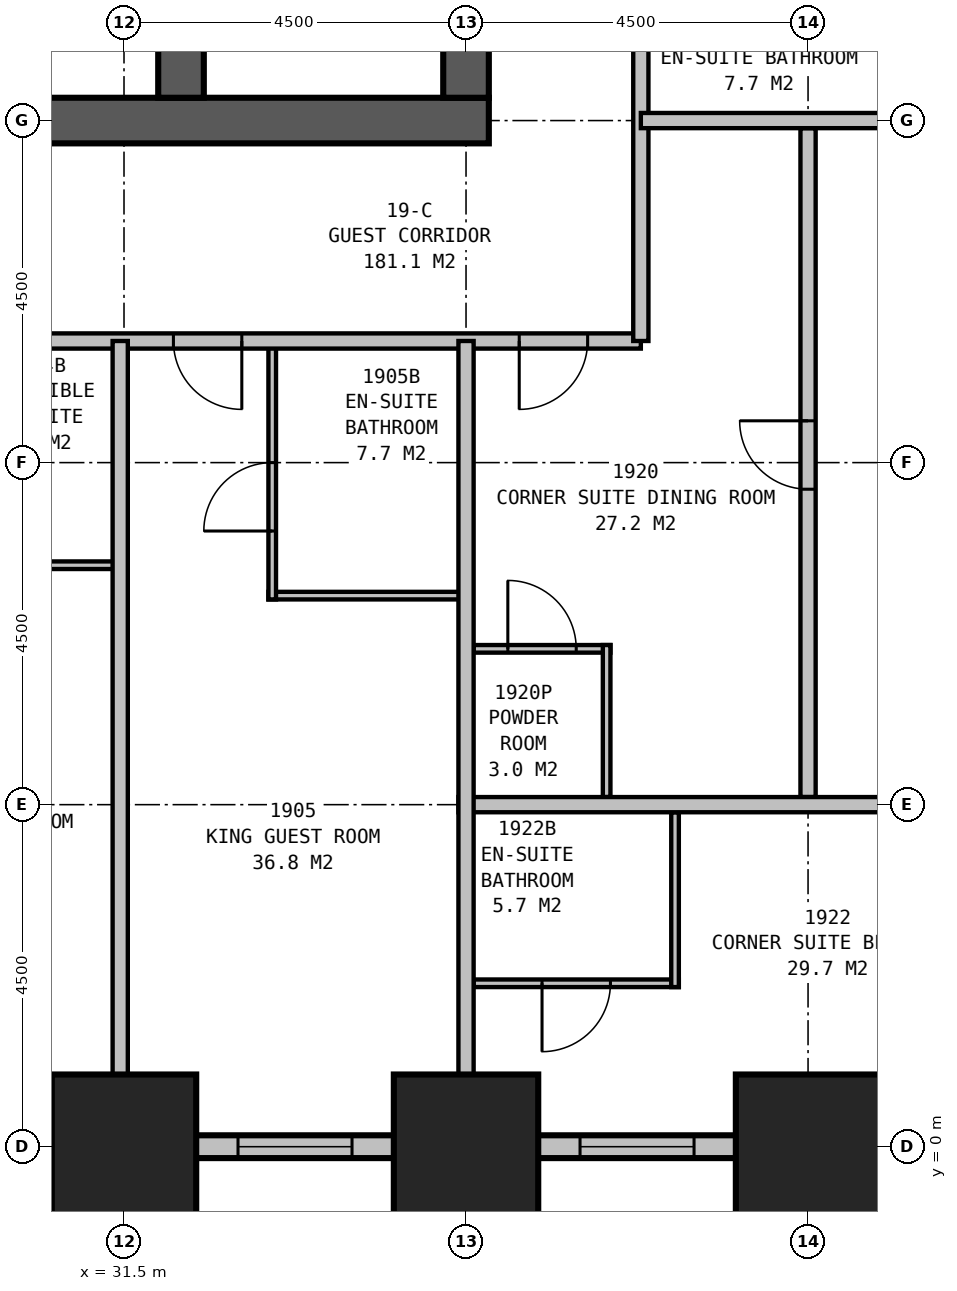
"""IFC4 building model, lengths in metres.
Left out: names, types, materials, properties, quantities, classifications, styles, units other than length and angle.
Written with IfcOpenShell. Run it as: python <this file> out.ifc"""

import sys

from ifc_helpers import new_model, si_unit, direction, frame, frame_2d, origin, origin_2d, place, context, subcontext, project, spatial, rectangle, extrude, element, fill, save


model = new_model("IFC4")
c1 = context("Model", 3, precision=1e-05, world=origin(), true_north=direction((0.0, 1.0)))
c2 = subcontext(c1, "Body", "Model", "MODEL_VIEW")
j1 = project(units=[si_unit("LENGTHUNIT", "METRE"), si_unit("PLANEANGLEUNIT", "RADIAN")], contexts=[c1])
p1 = place(None, origin())
s1 = spatial("IfcSite", under=j1, at=p1, CompositionType="ELEMENT")
p2 = place(p1, origin())
s2 = spatial("IfcBuilding", under=s1, at=p2, CompositionType="ELEMENT")
p3 = place(p2, frame((0.0, 0.0, 78.7)))
s3 = spatial("IfcBuildingStorey", under=s2, at=p3, CompositionType="ELEMENT", Elevation=78.7)
for number, where, z_axis, x_axis in (
    (1, (31.5, 0.0, 0.0), (0.0, 0.0, 1.0), (1.0, 0.0, 0.0)),
    (2, (36.0, 0.0, 0.0), (0.0, 0.0, 1.0), (1.0, 0.0, 0.0)),
    (3, (40.5, 0.0, 0.0), (0.0, 0.0, 1.0), (1.0, 0.0, 0.0)),
):
    element("IfcColumn", number, at=place(p3, frame(where, z_axis=z_axis, x_axis=x_axis)), inside=s3, PredefinedType="COLUMN", context=c2, shape_type="SweptSolid", body=[
        extrude(rectangle(XDim=1.9, YDim=1.9, at=origin_2d()), origin(), (0.0, 0.0, 1.0), 3.5),
    ])
p4 = place(p3, frame((13.2, 13.5, 0.0), z_axis=(0.0, 0.0, 1.0), x_axis=(1.0, 0.0, 0.0)))
e4 = element("IfcWall", 4, at=p4, inside=s3, PredefinedType="SHEAR", context=c2, shape_type="SweptSolid", body=[
    extrude(rectangle(XDim=23.1, YDim=0.6, at=frame_2d((11.55, 0.0))), origin(), (0.0, 0.0, 1.0), 3.5),
])
p5 = place(p3, frame((32.25, 13.8, 0.0), z_axis=(0.0, 0.0, 1.0), x_axis=(0.0, 1.0, 0.0)))
e5 = element("IfcWall", 5, at=p5, inside=s3, PredefinedType="SHEAR", context=c2, shape_type="SweptSolid", body=[
    extrude(rectangle(XDim=12.9, YDim=0.6, at=frame_2d((6.45, 0.0))), origin(), (0.0, 0.0, 1.0), 3.5),
])
p6 = place(p5, frame((5.05, 0.0, 0.0), z_axis=(0.0, 0.0, 1.0), x_axis=(-1.0, 0.0, 0.0)))
e6 = element("IfcOpeningElement", 6, at=p6, cuts=e5, PredefinedType="OPENING", context=c2, shape_type="SweptSolid", body=[
    extrude(rectangle(XDim=1.2, YDim=2.1, at=frame_2d((0.6, 1.05))), frame((0.0, 0.31, 0.0), z_axis=(0.0, -1.0, 0.0), x_axis=(1.0, 0.0, 0.0)), (0.0, 0.0, 1.0), 0.62),
])
p7 = place(p3, frame((36.0, 13.8, 0.0), z_axis=(0.0, 0.0, 1.0), x_axis=(0.0, 1.0, 0.0)))
e7 = element("IfcWall", 7, at=p7, inside=s3, PredefinedType="SHEAR", context=c2, shape_type="SweptSolid", body=[
    extrude(rectangle(XDim=2.7, YDim=0.6, at=frame_2d((1.35, 0.0))), origin(), (0.0, 0.0, 1.0), 3.5),
])
p8 = place(p3, frame((4.35, 0.0, 0.0), z_axis=(0.0, 0.0, 1.0), x_axis=(1.0, 0.0, 0.0)))
e8 = element("IfcWall", 8, at=p8, inside=s3, PredefinedType="STANDARD", context=c2, shape_type="SweptSolid", body=[
    extrude(rectangle(XDim=40.8, YDim=0.3, at=frame_2d((20.4, 0.0))), origin(), (0.0, 0.0, 1.0), 2.05),
])
p9 = place(p8, frame((1.65, 0.0, 0.5)))
e9 = element("IfcOpeningElement", 9, at=p9, cuts=e8, PredefinedType="OPENING", context=c2, shape_type="SweptSolid", body=[
    extrude(rectangle(XDim=1.5, YDim=1.4, at=frame_2d((0.75, 0.7))), frame((0.0, 0.16, 0.0), z_axis=(0.0, -1.0, 0.0), x_axis=(1.0, 0.0, 0.0)), (0.0, 0.0, 1.0), 0.32),
])
p10 = place(p8, frame((6.15, 0.0, 0.5)))
e10 = element("IfcOpeningElement", 10, at=p10, cuts=e8, PredefinedType="OPENING", context=c2, shape_type="SweptSolid", body=[
    extrude(rectangle(XDim=1.5, YDim=1.4, at=frame_2d((0.75, 0.7))), frame((0.0, 0.16, 0.0), z_axis=(0.0, -1.0, 0.0), x_axis=(1.0, 0.0, 0.0)), (0.0, 0.0, 1.0), 0.32),
])
p11 = place(p8, frame((10.65, 0.0, 0.5)))
e11 = element("IfcOpeningElement", 11, at=p11, cuts=e8, PredefinedType="OPENING", context=c2, shape_type="SweptSolid", body=[
    extrude(rectangle(XDim=1.5, YDim=1.4, at=frame_2d((0.75, 0.7))), frame((0.0, 0.16, 0.0), z_axis=(0.0, -1.0, 0.0), x_axis=(1.0, 0.0, 0.0)), (0.0, 0.0, 1.0), 0.32),
])
p12 = place(p8, frame((15.15, 0.0, 0.5)))
e12 = element("IfcOpeningElement", 12, at=p12, cuts=e8, PredefinedType="OPENING", context=c2, shape_type="SweptSolid", body=[
    extrude(rectangle(XDim=1.5, YDim=1.4, at=frame_2d((0.75, 0.7))), frame((0.0, 0.16, 0.0), z_axis=(0.0, -1.0, 0.0), x_axis=(1.0, 0.0, 0.0)), (0.0, 0.0, 1.0), 0.32),
])
p13 = place(p8, frame((19.65, 0.0, 0.5)))
e13 = element("IfcOpeningElement", 13, at=p13, cuts=e8, PredefinedType="OPENING", context=c2, shape_type="SweptSolid", body=[
    extrude(rectangle(XDim=1.5, YDim=1.4, at=frame_2d((0.75, 0.7))), frame((0.0, 0.16, 0.0), z_axis=(0.0, -1.0, 0.0), x_axis=(1.0, 0.0, 0.0)), (0.0, 0.0, 1.0), 0.32),
])
p14 = place(p8, frame((24.15, 0.0, 0.5)))
e14 = element("IfcOpeningElement", 14, at=p14, cuts=e8, PredefinedType="OPENING", context=c2, shape_type="SweptSolid", body=[
    extrude(rectangle(XDim=1.5, YDim=1.4, at=frame_2d((0.75, 0.7))), frame((0.0, 0.16, 0.0), z_axis=(0.0, -1.0, 0.0), x_axis=(1.0, 0.0, 0.0)), (0.0, 0.0, 1.0), 0.32),
])
p15 = place(p8, frame((28.65, 0.0, 0.5)))
e15 = element("IfcOpeningElement", 15, at=p15, cuts=e8, PredefinedType="OPENING", context=c2, shape_type="SweptSolid", body=[
    extrude(rectangle(XDim=1.5, YDim=1.4, at=frame_2d((0.75, 0.7))), frame((0.0, 0.16, 0.0), z_axis=(0.0, -1.0, 0.0), x_axis=(1.0, 0.0, 0.0)), (0.0, 0.0, 1.0), 0.32),
])
p16 = place(p8, frame((33.15, 0.0, 0.5)))
e16 = element("IfcOpeningElement", 16, at=p16, cuts=e8, PredefinedType="OPENING", context=c2, shape_type="SweptSolid", body=[
    extrude(rectangle(XDim=1.5, YDim=1.4, at=frame_2d((0.75, 0.7))), frame((0.0, 0.16, 0.0), z_axis=(0.0, -1.0, 0.0), x_axis=(1.0, 0.0, 0.0)), (0.0, 0.0, 1.0), 0.32),
])
p17 = place(p8, frame((37.65, 0.0, 0.5)))
e17 = element("IfcOpeningElement", 17, at=p17, cuts=e8, PredefinedType="OPENING", context=c2, shape_type="SweptSolid", body=[
    extrude(rectangle(XDim=1.5, YDim=1.4, at=frame_2d((0.75, 0.7))), frame((0.0, 0.16, 0.0), z_axis=(0.0, -1.0, 0.0), x_axis=(1.0, 0.0, 0.0)), (0.0, 0.0, 1.0), 0.32),
])
p18 = place(p3, frame((11.2, 10.6, 0.0), z_axis=(0.0, 0.0, 1.0), x_axis=(1.0, 0.0, 0.0)))
e18 = element("IfcWall", 18, at=p18, inside=s3, PredefinedType="PARTITIONING", context=c2, shape_type="SweptSolid", body=[
    extrude(rectangle(XDim=27.1, YDim=0.2, at=frame_2d((13.55, 0.0))), origin(), (0.0, 0.0, 1.0), 3.25),
])
p19 = place(p18, frame((3.85, 0.0, 0.0), z_axis=(0.0, 0.0, 1.0), x_axis=(-1.0, 0.0, 0.0)))
e19 = element("IfcOpeningElement", 19, at=p19, cuts=e18, PredefinedType="OPENING", context=c2, shape_type="SweptSolid", body=[
    extrude(rectangle(XDim=0.9, YDim=2.1, at=frame_2d((0.45, 1.05))), frame((0.0, 0.11, 0.0), z_axis=(0.0, -1.0, 0.0), x_axis=(1.0, 0.0, 0.0)), (0.0, 0.0, 1.0), 0.22),
])
p20 = place(p18, frame((8.15, 0.0, 0.0), z_axis=(0.0, 0.0, 1.0), x_axis=(-1.0, 0.0, 0.0)))
e20 = element("IfcOpeningElement", 20, at=p20, cuts=e18, PredefinedType="OPENING", context=c2, shape_type="SweptSolid", body=[
    extrude(rectangle(XDim=1.0, YDim=2.1, at=frame_2d((0.5, 1.05))), frame((0.0, 0.11, 0.0), z_axis=(0.0, -1.0, 0.0), x_axis=(1.0, 0.0, 0.0)), (0.0, 0.0, 1.0), 0.22),
])
p21 = place(p18, frame((12.85, 0.0, 0.0), z_axis=(0.0, 0.0, 1.0), x_axis=(-1.0, 0.0, 0.0)))
e21 = element("IfcOpeningElement", 21, at=p21, cuts=e18, PredefinedType="OPENING", context=c2, shape_type="SweptSolid", body=[
    extrude(rectangle(XDim=0.9, YDim=2.1, at=frame_2d((0.45, 1.05))), frame((0.0, 0.11, 0.0), z_axis=(0.0, -1.0, 0.0), x_axis=(1.0, 0.0, 0.0)), (0.0, 0.0, 1.0), 0.22),
])
p22 = place(p18, frame((17.1, 0.0, 0.0), z_axis=(0.0, 0.0, 1.0), x_axis=(-1.0, 0.0, 0.0)))
e22 = element("IfcOpeningElement", 22, at=p22, cuts=e18, PredefinedType="OPENING", context=c2, shape_type="SweptSolid", body=[
    extrude(rectangle(XDim=1.0, YDim=2.1, at=frame_2d((0.5, 1.05))), frame((0.0, 0.11, 0.0), z_axis=(0.0, -1.0, 0.0), x_axis=(1.0, 0.0, 0.0)), (0.0, 0.0, 1.0), 0.22),
])
p23 = place(p18, frame((21.85, 0.0, 0.0), z_axis=(0.0, 0.0, 1.0), x_axis=(-1.0, 0.0, 0.0)))
e23 = element("IfcOpeningElement", 23, at=p23, cuts=e18, PredefinedType="OPENING", context=c2, shape_type="SweptSolid", body=[
    extrude(rectangle(XDim=0.9, YDim=2.1, at=frame_2d((0.45, 1.05))), frame((0.0, 0.11, 0.0), z_axis=(0.0, -1.0, 0.0), x_axis=(1.0, 0.0, 0.0)), (0.0, 0.0, 1.0), 0.22),
])
p24 = place(p18, frame((1.6, 0.0, 0.0), z_axis=(0.0, 0.0, 1.0), x_axis=(-1.0, 0.0, 0.0)))
e24 = element("IfcOpeningElement", 24, at=p24, cuts=e18, PredefinedType="OPENING", context=c2, shape_type="SweptSolid", body=[
    extrude(rectangle(XDim=0.9, YDim=2.1, at=frame_2d((0.45, 1.05))), frame((0.0, 0.11, 0.0), z_axis=(0.0, -1.0, 0.0), x_axis=(1.0, 0.0, 0.0)), (0.0, 0.0, 1.0), 0.22),
])
p25 = place(p18, frame((26.4, 0.0, 0.0), z_axis=(0.0, 0.0, 1.0), x_axis=(-1.0, 0.0, 0.0)))
e25 = element("IfcOpeningElement", 25, at=p25, cuts=e18, PredefinedType="OPENING", context=c2, shape_type="SweptSolid", body=[
    extrude(rectangle(XDim=0.9, YDim=2.1, at=frame_2d((0.45, 1.05))), frame((0.0, 0.11, 0.0), z_axis=(0.0, -1.0, 0.0), x_axis=(1.0, 0.0, 0.0)), (0.0, 0.0, 1.0), 0.22),
])
p26 = place(p3, frame((38.3, 10.6, 0.0), z_axis=(0.0, 0.0, 1.0), x_axis=(0.0, 1.0, 0.0)))
e26 = element("IfcWall", 26, at=p26, inside=s3, PredefinedType="PARTITIONING", context=c2, shape_type="SweptSolid", body=[
    extrude(rectangle(XDim=18.7, YDim=0.2, at=frame_2d((9.35, 0.0))), origin(), (0.0, 0.0, 1.0), 3.25),
])
p27 = place(p26, frame((6.75, 0.0, 0.0), z_axis=(0.0, 0.0, 1.0), x_axis=(-1.0, 0.0, 0.0)))
e27 = element("IfcOpeningElement", 27, at=p27, cuts=e26, PredefinedType="OPENING", context=c2, shape_type="SweptSolid", body=[
    extrude(rectangle(XDim=0.9, YDim=2.1, at=frame_2d((0.45, 1.05))), frame((0.0, 0.11, 0.0), z_axis=(0.0, -1.0, 0.0), x_axis=(1.0, 0.0, 0.0)), (0.0, 0.0, 1.0), 0.22),
])
p28 = place(p26, frame((9.85, 0.0, 0.0), z_axis=(0.0, 0.0, 1.0), x_axis=(-1.0, 0.0, 0.0)))
e28 = element("IfcOpeningElement", 28, at=p28, cuts=e26, PredefinedType="OPENING", context=c2, shape_type="SweptSolid", body=[
    extrude(rectangle(XDim=1.0, YDim=2.1, at=frame_2d((0.5, 1.05))), frame((0.0, 0.11, 0.0), z_axis=(0.0, -1.0, 0.0), x_axis=(1.0, 0.0, 0.0)), (0.0, 0.0, 1.0), 0.22),
])
p29 = place(p26, frame((15.65, 0.0, 0.0), z_axis=(0.0, 0.0, 1.0), x_axis=(-1.0, 0.0, 0.0)))
e29 = element("IfcOpeningElement", 29, at=p29, cuts=e26, PredefinedType="OPENING", context=c2, shape_type="SweptSolid", body=[
    extrude(rectangle(XDim=1.0, YDim=2.1, at=frame_2d((0.5, 1.05))), frame((0.0, 0.11, 0.0), z_axis=(0.0, -1.0, 0.0), x_axis=(1.0, 0.0, 0.0)), (0.0, 0.0, 1.0), 0.22),
])
p30 = place(p3, frame((31.45, 10.6, 0.0), z_axis=(0.0, 0.0, 1.0), x_axis=(0.0, -1.0, 0.0)))
e30 = element("IfcWall", 30, at=p30, inside=s3, PredefinedType="PARTITIONING", context=c2, shape_type="SweptSolid", body=[
    extrude(rectangle(XDim=10.6, YDim=0.2, at=frame_2d((5.3, 0.0))), origin(), (0.0, 0.0, 1.0), 2.25),
])
p31 = place(p3, frame((28.65, 7.65, 0.0), z_axis=(0.0, 0.0, 1.0), x_axis=(1.0, 0.0, 0.0)))
e31 = element("IfcWall", 31, at=p31, inside=s3, PredefinedType="PLUMBINGWALL", context=c2, shape_type="SweptSolid", body=[
    extrude(rectangle(XDim=2.8, YDim=0.1, at=frame_2d((1.4, 0.0))), origin(), (0.0, 0.0, 1.0), 3.25),
])
p32 = place(p3, frame((33.4, 7.25, 0.0), z_axis=(0.0, 0.0, 1.0), x_axis=(1.0, 0.0, 0.0)))
e32 = element("IfcWall", 32, at=p32, inside=s3, PredefinedType="PLUMBINGWALL", context=c2, shape_type="SweptSolid", body=[
    extrude(rectangle(XDim=2.6, YDim=0.1, at=frame_2d((1.3, 0.0))), origin(), (0.0, 0.0, 1.0), 3.25),
])
p33 = place(p3, frame((33.45, 10.6, 0.0), z_axis=(0.0, 0.0, 1.0), x_axis=(0.0, -1.0, 0.0)))
e33 = element("IfcWall", 33, at=p33, inside=s3, PredefinedType="PLUMBINGWALL", context=c2, shape_type="SweptSolid", body=[
    extrude(rectangle(XDim=3.4, YDim=0.1, at=frame_2d((1.7, 0.0))), origin(), (0.0, 0.0, 1.0), 3.25),
])
p34 = place(p33, frame((2.5, 0.0, 0.0), z_axis=(0.0, 0.0, 1.0), x_axis=(-1.0, 0.0, 0.0)))
e34 = element("IfcOpeningElement", 34, at=p34, cuts=e33, PredefinedType="OPENING", context=c2, shape_type="SweptSolid", body=[
    extrude(rectangle(XDim=0.9, YDim=2.1, at=frame_2d((0.45, 1.05))), frame((0.0, 0.06, 0.0), z_axis=(0.0, -1.0, 0.0), x_axis=(1.0, 0.0, 0.0)), (0.0, 0.0, 1.0), 0.12),
])
p35 = place(p3, frame((38.3, 13.5, 0.0), z_axis=(0.0, 0.0, 1.0), x_axis=(1.0, 0.0, 0.0)))
e35 = element("IfcWall", 35, at=p35, inside=s3, PredefinedType="PARTITIONING", context=c2, shape_type="SweptSolid", body=[
    extrude(rectangle(XDim=9.921, YDim=0.2, at=frame_2d((4.96, 0.0))), origin(), (0.0, 0.0, 1.0), 1.95),
])
p36 = place(p3, frame((36.0, 10.6, 0.0), z_axis=(0.0, 0.0, 1.0), x_axis=(0.0, -1.0, 0.0)))
e36 = element("IfcWall", 36, at=p36, inside=s3, PredefinedType="PARTITIONING", context=c2, shape_type="SweptSolid", body=[
    extrude(rectangle(XDim=10.6, YDim=0.2, at=frame_2d((5.3, 0.0))), origin(), (0.0, 0.0, 1.0), 2.25),
])
p37 = place(p3, frame((35.9, 4.5, 0.0), z_axis=(0.0, 0.0, 1.0), x_axis=(1.0, 0.0, 0.0)))
e37 = element("IfcWall", 37, at=p37, inside=s3, PredefinedType="PARTITIONING", context=c2, shape_type="SweptSolid", body=[
    extrude(rectangle(XDim=9.1, YDim=0.2, at=frame_2d((4.55, 0.0))), origin(), (0.0, 0.0, 1.0), 3.25),
])
p38 = place(p37, frame((7.1, 0.0, 0.0)))
e38 = element("IfcOpeningElement", 38, at=p38, cuts=e37, PredefinedType="OPENING", context=c2, shape_type="SweptSolid", body=[
    extrude(rectangle(XDim=0.9, YDim=2.1, at=frame_2d((0.45, 1.05))), frame((0.0, 0.11, 0.0), z_axis=(0.0, -1.0, 0.0), x_axis=(1.0, 0.0, 0.0)), (0.0, 0.0, 1.0), 0.22),
])
p39 = place(p3, frame((40.5, 4.6, 0.0), z_axis=(0.0, 0.0, 1.0), x_axis=(0.0, 1.0, 0.0)))
e39 = element("IfcWall", 39, at=p39, inside=s3, PredefinedType="PARTITIONING", context=c2, shape_type="SweptSolid", body=[
    extrude(rectangle(XDim=8.8, YDim=0.2, at=frame_2d((4.4, 0.0))), origin(), (0.0, 0.0, 1.0), 2.25),
])
p40 = place(p39, frame((4.05, 0.0, 0.0)))
e40 = element("IfcOpeningElement", 40, at=p40, cuts=e39, PredefinedType="OPENING", context=c2, shape_type="SweptSolid", body=[
    extrude(rectangle(XDim=0.9, YDim=2.1, at=frame_2d((0.45, 1.05))), frame((0.0, 0.11, 0.0), z_axis=(0.0, -1.0, 0.0), x_axis=(1.0, 0.0, 0.0)), (0.0, 0.0, 1.0), 0.22),
])
p41 = place(p3, frame((37.85, 4.6, 0.0), z_axis=(0.0, 0.0, 1.0), x_axis=(0.0, 1.0, 0.0)))
e41 = element("IfcWall", 41, at=p41, inside=s3, PredefinedType="PLUMBINGWALL", context=c2, shape_type="SweptSolid", body=[
    extrude(rectangle(XDim=2.0, YDim=0.1, at=frame_2d((1.0, 0.0))), origin(), (0.0, 0.0, 1.0), 3.25),
])
p42 = place(p3, frame((36.1, 6.55, 0.0), z_axis=(0.0, 0.0, 1.0), x_axis=(1.0, 0.0, 0.0)))
e42 = element("IfcWall", 42, at=p42, inside=s3, PredefinedType="PLUMBINGWALL", context=c2, shape_type="SweptSolid", body=[
    extrude(rectangle(XDim=1.8, YDim=0.1, at=frame_2d((0.9, 0.0))), origin(), (0.0, 0.0, 1.0), 3.25),
])
p43 = place(p42, frame((0.45, 0.0, 0.0)))
e43 = element("IfcOpeningElement", 43, at=p43, cuts=e42, PredefinedType="OPENING", context=c2, shape_type="SweptSolid", body=[
    extrude(rectangle(XDim=0.9, YDim=2.1, at=frame_2d((0.45, 1.05))), frame((0.0, 0.06, 0.0), z_axis=(0.0, -1.0, 0.0), x_axis=(1.0, 0.0, 0.0)), (0.0, 0.0, 1.0), 0.12),
])
p44 = place(p3, frame((38.75, 4.4, 0.0), z_axis=(0.0, 0.0, 1.0), x_axis=(0.0, -1.0, 0.0)))
e44 = element("IfcWall", 44, at=p44, inside=s3, PredefinedType="PLUMBINGWALL", context=c2, shape_type="SweptSolid", body=[
    extrude(rectangle(XDim=2.3, YDim=0.1, at=frame_2d((1.15, 0.0))), origin(), (0.0, 0.0, 1.0), 3.25),
])
p45 = place(p3, frame((36.1, 2.15, 0.0), z_axis=(0.0, 0.0, 1.0), x_axis=(1.0, 0.0, 0.0)))
e45 = element("IfcWall", 45, at=p45, inside=s3, PredefinedType="PLUMBINGWALL", context=c2, shape_type="SweptSolid", body=[
    extrude(rectangle(XDim=2.7, YDim=0.1, at=frame_2d((1.35, 0.0))), origin(), (0.0, 0.0, 1.0), 3.25),
])
p46 = place(p45, frame((1.8, 0.0, 0.0), z_axis=(0.0, 0.0, 1.0), x_axis=(-1.0, 0.0, 0.0)))
e46 = element("IfcOpeningElement", 46, at=p46, cuts=e45, PredefinedType="OPENING", context=c2, shape_type="SweptSolid", body=[
    extrude(rectangle(XDim=0.9, YDim=2.1, at=frame_2d((0.45, 1.05))), frame((0.0, 0.06, 0.0), z_axis=(0.0, -1.0, 0.0), x_axis=(1.0, 0.0, 0.0)), (0.0, 0.0, 1.0), 0.12),
])
p47 = place(p15, origin())
e47 = element("IfcWindow", 47, at=p47, inside=s3, PartitioningType="SINGLE_PANEL", PredefinedType="WINDOW", context=c2, shape_type="SweptSolid", body=[
    extrude(rectangle(XDim=1.5, YDim=1.4, at=frame_2d((0.75, 0.7))), frame((0.0, 0.03, 0.0), z_axis=(0.0, -1.0, 0.0), x_axis=(1.0, 0.0, 0.0)), (0.0, 0.0, 1.0), 0.06),
])
fill(e15, e47)
p48 = place(p16, origin())
e48 = element("IfcWindow", 48, at=p48, inside=s3, PartitioningType="SINGLE_PANEL", PredefinedType="WINDOW", context=c2, shape_type="SweptSolid", body=[
    extrude(rectangle(XDim=1.5, YDim=1.4, at=frame_2d((0.75, 0.7))), frame((0.0, 0.03, 0.0), z_axis=(0.0, -1.0, 0.0), x_axis=(1.0, 0.0, 0.0)), (0.0, 0.0, 1.0), 0.06),
])
fill(e16, e48)
p49 = place(p23, origin())
e49 = element("IfcDoor", 49, at=p49, inside=s3, OperationType="SINGLE_SWING_LEFT", PredefinedType="DOOR", context=c2, shape_type="SweptSolid", body=[
    extrude(rectangle(XDim=0.9, YDim=2.1, at=frame_2d((0.45, 1.05))), frame((0.0, 0.025, 0.0), z_axis=(0.0, -1.0, 0.0), x_axis=(1.0, 0.0, 0.0)), (0.0, 0.0, 1.0), 0.05),
])
fill(e23, e49)
p50 = place(p25, origin())
e50 = element("IfcDoor", 50, at=p50, inside=s3, OperationType="SINGLE_SWING_RIGHT", PredefinedType="DOOR", context=c2, shape_type="SweptSolid", body=[
    extrude(rectangle(XDim=0.9, YDim=2.1, at=frame_2d((0.45, 1.05))), frame((0.0, 0.025, 0.0), z_axis=(0.0, -1.0, 0.0), x_axis=(1.0, 0.0, 0.0)), (0.0, 0.0, 1.0), 0.05),
])
fill(e25, e50)
p51 = place(p34, origin())
e51 = element("IfcDoor", 51, at=p51, inside=s3, OperationType="SINGLE_SWING_LEFT", PredefinedType="DOOR", context=c2, shape_type="SweptSolid", body=[
    extrude(rectangle(XDim=0.9, YDim=2.1, at=frame_2d((0.45, 1.05))), frame((0.0, 0.025, 0.0), z_axis=(0.0, -1.0, 0.0), x_axis=(1.0, 0.0, 0.0)), (0.0, 0.0, 1.0), 0.05),
])
fill(e34, e51)
p52 = place(p40, origin())
e52 = element("IfcDoor", 52, at=p52, inside=s3, OperationType="SINGLE_SWING_RIGHT", PredefinedType="DOOR", context=c2, shape_type="SweptSolid", body=[
    extrude(rectangle(XDim=0.9, YDim=2.1, at=frame_2d((0.45, 1.05))), frame((0.0, 0.025, 0.0), z_axis=(0.0, -1.0, 0.0), x_axis=(1.0, 0.0, 0.0)), (0.0, 0.0, 1.0), 0.05),
])
fill(e40, e52)
p53 = place(p43, origin())
e53 = element("IfcDoor", 53, at=p53, inside=s3, OperationType="SINGLE_SWING_LEFT", PredefinedType="DOOR", context=c2, shape_type="SweptSolid", body=[
    extrude(rectangle(XDim=0.9, YDim=2.1, at=frame_2d((0.45, 1.05))), frame((0.0, 0.025, 0.0), z_axis=(0.0, -1.0, 0.0), x_axis=(1.0, 0.0, 0.0)), (0.0, 0.0, 1.0), 0.05),
])
fill(e43, e53)
p54 = place(p46, origin())
e54 = element("IfcDoor", 54, at=p54, inside=s3, OperationType="SINGLE_SWING_RIGHT", PredefinedType="DOOR", context=c2, shape_type="SweptSolid", body=[
    extrude(rectangle(XDim=0.9, YDim=2.1, at=frame_2d((0.45, 1.05))), frame((0.0, 0.025, 0.0), z_axis=(0.0, -1.0, 0.0), x_axis=(1.0, 0.0, 0.0)), (0.0, 0.0, 1.0), 0.05),
])
fill(e46, e54)
save(model, sys.argv[1])
